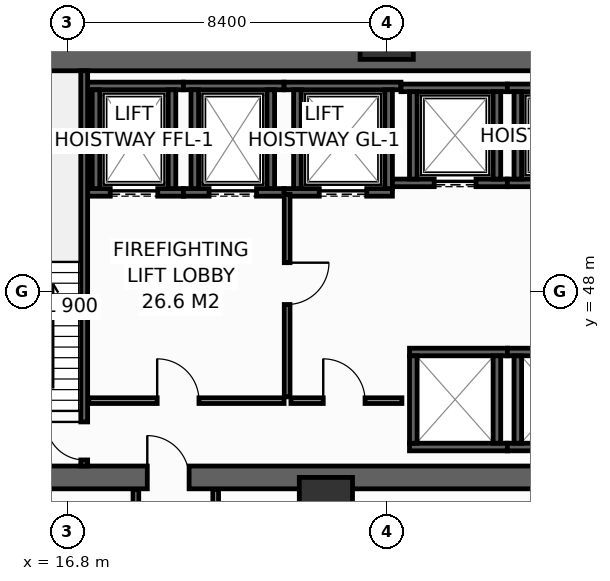
"""IFC4 building model, lengths in metres.
Left out: names, types, materials, properties, quantities, classifications, styles, units other than length and angle.
Written with IfcOpenShell. Run it as: python <this file> out.ifc"""

import sys

from ifc_helpers import new_model, si_unit, direction, frame, frame_2d, origin, origin_2d, place, context, subcontext, project, spatial, rectangle, hollow_rectangle, extrude, element, fill, save


model = new_model("IFC4")
c1 = context("Model", 3, precision=1e-05, world=origin(), true_north=direction((0.0, 1.0)))
c2 = subcontext(c1, "Body", "Model", "MODEL_VIEW")
j1 = project(units=[si_unit("LENGTHUNIT", "METRE"), si_unit("PLANEANGLEUNIT", "RADIAN")], contexts=[c1])
p1 = place(None, origin())
s1 = spatial("IfcSite", under=j1, at=p1, CompositionType="ELEMENT")
p2 = place(p1, origin())
s2 = spatial("IfcBuilding", under=s1, at=p2, CompositionType="ELEMENT")
p3 = place(p2, frame((0.0, 0.0, 27.6)))
s3 = spatial("IfcBuildingStorey", under=s2, at=p3, CompositionType="ELEMENT", Elevation=27.6)
p4 = place(p3, frame((13.5, 43.1, 0.0), z_axis=(0.0, 0.0, 1.0), x_axis=(1.0, 0.0, 0.0)))
e1 = element("IfcWall", 1, at=p4, inside=s3, PredefinedType="SHEAR", context=c2, shape_type="SweptSolid", body=[
    extrude(rectangle(XDim=32.9, YDim=0.6, at=frame_2d((16.45, 0.0))), origin(), (0.0, 0.0, 1.0), 5.15),
])
p5 = place(p4, frame((5.4, 0.0, 0.0)))
e2 = element("IfcOpeningElement", 2, at=p5, cuts=e1, PredefinedType="OPENING", context=c2, shape_type="SweptSolid", body=[
    extrude(rectangle(XDim=1.1, YDim=2.15, at=frame_2d((0.55, 1.075))), frame((0.0, 0.31, 0.0), z_axis=(0.0, -1.0, 0.0), x_axis=(1.0, 0.0, 0.0)), (0.0, 0.0, 1.0), 0.62),
])
p6 = place(p4, frame((25.6, 0.0, 0.0)))
e3 = element("IfcOpeningElement", 3, at=p6, cuts=e1, PredefinedType="OPENING", context=c2, shape_type="SweptSolid", body=[
    extrude(rectangle(XDim=1.1, YDim=2.15, at=frame_2d((0.55, 1.075))), frame((0.0, 0.31, 0.0), z_axis=(0.0, -1.0, 0.0), x_axis=(1.0, 0.0, 0.0)), (0.0, 0.0, 1.0), 0.62),
])
p7 = place(p3, frame((13.5, 54.1, 0.0), z_axis=(0.0, 0.0, 1.0), x_axis=(1.0, 0.0, 0.0)))
e4 = element("IfcWall", 4, at=p7, inside=s3, PredefinedType="SHEAR", context=c2, shape_type="SweptSolid", body=[
    extrude(rectangle(XDim=32.9, YDim=0.6, at=frame_2d((16.45, 0.0))), origin(), (0.0, 0.0, 1.0), 5.15),
])
for number, where, z_axis, x_axis in (
    (5, (25.2, 54.8, 0.0), (0.0, 0.0, 1.0), (1.0, 0.0, 0.0)),
    (6, (23.6, 42.4, 0.0), (0.0, 0.0, 1.0), (1.0, 0.0, 0.0)),
):
    element("IfcColumn", number, at=place(p3, frame(where, z_axis=z_axis, x_axis=x_axis)), inside=s3, PredefinedType="COLUMN", context=c2, shape_type="SweptSolid", body=[
        extrude(hollow_rectangle(XDim=1.4, YDim=1.4, WallThickness=0.065, at=origin_2d()), origin(), (0.0, 0.0, 1.0), 5.4),
    ])
p8 = place(p3, frame((17.33, 50.6, 0.0), z_axis=(0.0, 0.0, 1.0), x_axis=(1.0, 0.0, 0.0)))
e7 = element("IfcWall", 7, at=p8, inside=s3, PredefinedType="SHEAR", context=c2, shape_type="SweptSolid", body=[
    extrude(rectangle(XDim=2.52, YDim=0.2, at=frame_2d((1.26, 0.0))), origin(), (0.0, 0.0, 1.0), 5.15),
])
p9 = place(p8, frame((0.595, 0.0, 0.0)))
e8 = element("IfcOpeningElement", 8, at=p9, cuts=e7, PredefinedType="OPENING", context=c2, shape_type="SweptSolid", body=[
    extrude(rectangle(XDim=1.25, YDim=2.3, at=frame_2d((0.625, 1.15))), frame((0.0, 0.11, 0.0), z_axis=(0.0, -1.0, 0.0), x_axis=(1.0, 0.0, 0.0)), (0.0, 0.0, 1.0), 0.22),
])
p10 = place(p3, frame((17.33, 53.4, 0.0), z_axis=(0.0, 0.0, 1.0), x_axis=(1.0, 0.0, 0.0)))
e9 = element("IfcWall", 9, at=p10, inside=s3, PredefinedType="SHEAR", context=c2, shape_type="SweptSolid", body=[
    extrude(rectangle(XDim=2.52, YDim=0.2, at=frame_2d((1.26, 0.0))), origin(), (0.0, 0.0, 1.0), 5.15),
])
for number, where, z_axis, x_axis in (
    (10, (17.55, 50.7, 0.0), (0.0, 0.0, 1.0), (0.0, 1.0, 0.0)),
    (11, (19.55, 50.7, 0.0), (0.0, 0.0, 1.0), (0.0, 1.0, 0.0)),
):
    element("IfcWall", number, at=place(p3, frame(where, z_axis=z_axis, x_axis=x_axis)), inside=s3, PredefinedType="SHEAR", context=c2, shape_type="SweptSolid", body=[
        extrude(rectangle(XDim=2.6, YDim=0.2, at=frame_2d((1.3, 0.0))), origin(), (0.0, 0.0, 1.0), 5.15),
    ])
p11 = place(p3, frame((19.85, 50.6, 0.0), z_axis=(0.0, 0.0, 1.0), x_axis=(1.0, 0.0, 0.0)))
e12 = element("IfcWall", 12, at=p11, inside=s3, PredefinedType="SHEAR", context=c2, shape_type="SweptSolid", body=[
    extrude(rectangle(XDim=2.65, YDim=0.2, at=frame_2d((1.325, 0.0))), origin(), (0.0, 0.0, 1.0), 5.15),
])
p12 = place(p11, frame((0.675, 0.0, 0.0)))
e13 = element("IfcOpeningElement", 13, at=p12, cuts=e12, PredefinedType="OPENING", context=c2, shape_type="SweptSolid", body=[
    extrude(rectangle(XDim=1.25, YDim=2.3, at=frame_2d((0.625, 1.15))), frame((0.0, 0.11, 0.0), z_axis=(0.0, -1.0, 0.0), x_axis=(1.0, 0.0, 0.0)), (0.0, 0.0, 1.0), 0.22),
])
p13 = place(p3, frame((19.85, 53.4, 0.0), z_axis=(0.0, 0.0, 1.0), x_axis=(1.0, 0.0, 0.0)))
e14 = element("IfcWall", 14, at=p13, inside=s3, PredefinedType="SHEAR", context=c2, shape_type="SweptSolid", body=[
    extrude(rectangle(XDim=2.65, YDim=0.2, at=frame_2d((1.325, 0.0))), origin(), (0.0, 0.0, 1.0), 5.15),
])
for number, where, z_axis, x_axis in (
    (15, (20.15, 50.7, 0.0), (0.0, 0.0, 1.0), (0.0, 1.0, 0.0)),
    (16, (22.15, 50.7, 0.0), (0.0, 0.0, 1.0), (0.0, 1.0, 0.0)),
):
    element("IfcWall", number, at=place(p3, frame(where, z_axis=z_axis, x_axis=x_axis)), inside=s3, PredefinedType="SHEAR", context=c2, shape_type="SweptSolid", body=[
        extrude(rectangle(XDim=2.6, YDim=0.2, at=frame_2d((1.3, 0.0))), origin(), (0.0, 0.0, 1.0), 5.15),
    ])
p14 = place(p3, frame((22.5, 50.6, 0.0), z_axis=(0.0, 0.0, 1.0), x_axis=(1.0, 0.0, 0.0)))
e17 = element("IfcWall", 17, at=p14, inside=s3, PredefinedType="SHEAR", context=c2, shape_type="SweptSolid", body=[
    extrude(rectangle(XDim=2.85, YDim=0.2, at=frame_2d((1.425, 0.0))), origin(), (0.0, 0.0, 1.0), 5.15),
])
p15 = place(p14, frame((0.925, 0.0, 0.0)))
e18 = element("IfcOpeningElement", 18, at=p15, cuts=e17, PredefinedType="OPENING", context=c2, shape_type="SweptSolid", body=[
    extrude(rectangle(XDim=1.25, YDim=2.3, at=frame_2d((0.625, 1.15))), frame((0.0, 0.11, 0.0), z_axis=(0.0, -1.0, 0.0), x_axis=(1.0, 0.0, 0.0)), (0.0, 0.0, 1.0), 0.22),
])
p16 = place(p3, frame((22.5, 53.4, 0.0), z_axis=(0.0, 0.0, 1.0), x_axis=(1.0, 0.0, 0.0)))
e19 = element("IfcWall", 19, at=p16, inside=s3, PredefinedType="SHEAR", context=c2, shape_type="SweptSolid", body=[
    extrude(rectangle(XDim=3.075, YDim=0.2, at=frame_2d((1.538, 0.0))), origin(), (0.0, 0.0, 1.0), 5.15),
])
for number, where, z_axis, x_axis in (
    (20, (22.85, 50.7, 0.0), (0.0, 0.0, 1.0), (0.0, 1.0, 0.0)),
    (21, (25.25, 50.7, 0.0), (0.0, 0.0, 1.0), (0.0, 1.0, 0.0)),
):
    element("IfcWall", number, at=place(p3, frame(where, z_axis=z_axis, x_axis=x_axis)), inside=s3, PredefinedType="SHEAR", context=c2, shape_type="SweptSolid", body=[
        extrude(rectangle(XDim=2.6, YDim=0.2, at=frame_2d((1.3, 0.0))), origin(), (0.0, 0.0, 1.0), 5.15),
    ])
p17 = place(p3, frame((25.35, 50.85, 0.0), z_axis=(0.0, 0.0, 1.0), x_axis=(1.0, 0.0, 0.0)))
e22 = element("IfcWall", 22, at=p17, inside=s3, PredefinedType="SHEAR", context=c2, shape_type="SweptSolid", body=[
    extrude(rectangle(XDim=3.025, YDim=0.2, at=frame_2d((1.512, 0.0))), origin(), (0.0, 0.0, 1.0), 5.15),
])
p18 = place(p17, frame((1.1, 0.0, 0.0)))
e23 = element("IfcOpeningElement", 23, at=p18, cuts=e22, PredefinedType="OPENING", context=c2, shape_type="SweptSolid", body=[
    extrude(rectangle(XDim=1.1, YDim=2.2, at=frame_2d((0.55, 1.1))), frame((0.0, 0.11, 0.0), z_axis=(0.0, -1.0, 0.0), x_axis=(1.0, 0.0, 0.0)), (0.0, 0.0, 1.0), 0.22),
])
p19 = place(p3, frame((25.575, 53.35, 0.0), z_axis=(0.0, 0.0, 1.0), x_axis=(1.0, 0.0, 0.0)))
e24 = element("IfcWall", 24, at=p19, inside=s3, PredefinedType="SHEAR", context=c2, shape_type="SweptSolid", body=[
    extrude(rectangle(XDim=2.8, YDim=0.2, at=frame_2d((1.4, 0.0))), origin(), (0.0, 0.0, 1.0), 5.15),
])
for number, where, z_axis, x_axis in (
    (25, (25.9, 50.95, 0.0), (0.0, 0.0, 1.0), (0.0, 1.0, 0.0)),
    (26, (28.1, 50.95, 0.0), (0.0, 0.0, 1.0), (0.0, 1.0, 0.0)),
):
    element("IfcWall", number, at=place(p3, frame(where, z_axis=z_axis, x_axis=x_axis)), inside=s3, PredefinedType="SHEAR", context=c2, shape_type="SweptSolid", body=[
        extrude(rectangle(XDim=2.3, YDim=0.2, at=frame_2d((1.15, 0.0))), origin(), (0.0, 0.0, 1.0), 5.15),
    ])
p20 = place(p3, frame((28.375, 50.85, 0.0), z_axis=(0.0, 0.0, 1.0), x_axis=(1.0, 0.0, 0.0)))
e27 = element("IfcWall", 27, at=p20, inside=s3, PredefinedType="SHEAR", context=c2, shape_type="SweptSolid", body=[
    extrude(rectangle(XDim=2.75, YDim=0.2, at=frame_2d((1.375, 0.0))), origin(), (0.0, 0.0, 1.0), 5.15),
])
p21 = place(p20, frame((0.825, 0.0, 0.0)))
e28 = element("IfcOpeningElement", 28, at=p21, cuts=e27, PredefinedType="OPENING", context=c2, shape_type="SweptSolid", body=[
    extrude(rectangle(XDim=1.1, YDim=2.2, at=frame_2d((0.55, 1.1))), frame((0.0, 0.11, 0.0), z_axis=(0.0, -1.0, 0.0), x_axis=(1.0, 0.0, 0.0)), (0.0, 0.0, 1.0), 0.22),
])
p22 = place(p3, frame((28.375, 53.35, 0.0), z_axis=(0.0, 0.0, 1.0), x_axis=(1.0, 0.0, 0.0)))
e29 = element("IfcWall", 29, at=p22, inside=s3, PredefinedType="SHEAR", context=c2, shape_type="SweptSolid", body=[
    extrude(rectangle(XDim=2.75, YDim=0.2, at=frame_2d((1.375, 0.0))), origin(), (0.0, 0.0, 1.0), 5.15),
])
p23 = place(p3, frame((28.65, 50.95, 0.0), z_axis=(0.0, 0.0, 1.0), x_axis=(0.0, 1.0, 0.0)))
e30 = element("IfcWall", 30, at=p23, inside=s3, PredefinedType="SHEAR", context=c2, shape_type="SweptSolid", body=[
    extrude(rectangle(XDim=2.3, YDim=0.2, at=frame_2d((1.15, 0.0))), origin(), (0.0, 0.0, 1.0), 5.15),
])
for number, where, z_axis, x_axis in (
    (31, (25.8, 43.9, 0.0), (0.0, 0.0, 1.0), (1.0, 0.0, 0.0)),
    (32, (25.8, 46.4, 0.0), (0.0, 0.0, 1.0), (1.0, 0.0, 0.0)),
):
    element("IfcWall", number, at=place(p3, frame(where, z_axis=z_axis, x_axis=x_axis)), inside=s3, PredefinedType="SHEAR", context=c2, shape_type="SweptSolid", body=[
        extrude(rectangle(XDim=2.575, YDim=0.2, at=frame_2d((1.288, 0.0))), origin(), (0.0, 0.0, 1.0), 5.15),
    ])
for number, where, z_axis, x_axis in (
    (33, (25.9, 44.0, 0.0), (0.0, 0.0, 1.0), (0.0, 1.0, 0.0)),
    (34, (28.1, 44.0, 0.0), (0.0, 0.0, 1.0), (0.0, 1.0, 0.0)),
):
    element("IfcWall", number, at=place(p3, frame(where, z_axis=z_axis, x_axis=x_axis)), inside=s3, PredefinedType="SHEAR", context=c2, shape_type="SweptSolid", body=[
        extrude(rectangle(XDim=2.3, YDim=0.2, at=frame_2d((1.15, 0.0))), origin(), (0.0, 0.0, 1.0), 5.15),
    ])
for number, where, z_axis, x_axis in (
    (35, (28.375, 43.9, 0.0), (0.0, 0.0, 1.0), (1.0, 0.0, 0.0)),
    (36, (28.375, 46.4, 0.0), (0.0, 0.0, 1.0), (1.0, 0.0, 0.0)),
):
    element("IfcWall", number, at=place(p3, frame(where, z_axis=z_axis, x_axis=x_axis)), inside=s3, PredefinedType="SHEAR", context=c2, shape_type="SweptSolid", body=[
        extrude(rectangle(XDim=2.75, YDim=0.2, at=frame_2d((1.375, 0.0))), origin(), (0.0, 0.0, 1.0), 5.15),
    ])
p24 = place(p3, frame((28.65, 44.0, 0.0), z_axis=(0.0, 0.0, 1.0), x_axis=(0.0, 1.0, 0.0)))
e37 = element("IfcWall", 37, at=p24, inside=s3, PredefinedType="SHEAR", context=c2, shape_type="SweptSolid", body=[
    extrude(rectangle(XDim=2.3, YDim=0.2, at=frame_2d((1.15, 0.0))), origin(), (0.0, 0.0, 1.0), 5.15),
])
p25 = place(p3, frame((17.24, 43.4, 0.0), z_axis=(0.0, 0.0, 1.0), x_axis=(0.0, 1.0, 0.0)))
e38 = element("IfcWall", 38, at=p25, inside=s3, PredefinedType="SHEAR", context=c2, shape_type="SweptSolid", body=[
    extrude(rectangle(XDim=10.4, YDim=0.18, at=frame_2d((5.2, 0.0))), origin(), (0.0, 0.0, 1.0), 5.15),
])
p26 = place(p25, frame((0.16, 0.0, 0.0)))
e39 = element("IfcOpeningElement", 39, at=p26, cuts=e38, PredefinedType="OPENING", context=c2, shape_type="SweptSolid", body=[
    extrude(rectangle(XDim=1.0, YDim=2.15, at=frame_2d((0.5, 1.075))), frame((0.0, 0.1, 0.0), z_axis=(0.0, -1.0, 0.0), x_axis=(1.0, 0.0, 0.0)), (0.0, 0.0, 1.0), 0.2),
])
p27 = place(p3, frame((17.36, 45.12, 0.0), z_axis=(0.0, 0.0, 1.0), x_axis=(1.0, 0.0, 0.0)))
e40 = element("IfcWall", 40, at=p27, inside=s3, PredefinedType="PARTITIONING", context=c2, shape_type="SweptSolid", body=[
    extrude(rectangle(XDim=5.14, YDim=0.15, at=frame_2d((2.57, 0.0))), origin(), (0.0, 0.0, 1.0), 5.15),
])
p28 = place(p27, frame((1.8, 0.0, 0.0)))
e41 = element("IfcOpeningElement", 41, at=p28, cuts=e40, PredefinedType="OPENING", context=c2, shape_type="SweptSolid", body=[
    extrude(rectangle(XDim=1.1, YDim=2.15, at=frame_2d((0.55, 1.075))), frame((0.0, 0.085, 0.0), z_axis=(0.0, -1.0, 0.0), x_axis=(1.0, 0.0, 0.0)), (0.0, 0.0, 1.0), 0.17),
])
p29 = place(p3, frame((22.58, 50.55, 0.0), z_axis=(0.0, 0.0, 1.0), x_axis=(0.0, -1.0, 0.0)))
e42 = element("IfcWall", 42, at=p29, inside=s3, PredefinedType="PARTITIONING", context=c2, shape_type="SweptSolid", body=[
    extrude(rectangle(XDim=5.33, YDim=0.15, at=frame_2d((2.665, 0.0))), origin(), (0.0, 0.0, 1.0), 5.15),
])
p30 = place(p29, frame((1.8, 0.0, 0.0)))
e43 = element("IfcOpeningElement", 43, at=p30, cuts=e42, PredefinedType="OPENING", context=c2, shape_type="SweptSolid", body=[
    extrude(rectangle(XDim=1.1, YDim=2.15, at=frame_2d((0.55, 1.075))), frame((0.0, 0.085, 0.0), z_axis=(0.0, -1.0, 0.0), x_axis=(1.0, 0.0, 0.0)), (0.0, 0.0, 1.0), 0.17),
])
p31 = place(p3, frame((22.68, 45.12, 0.0), z_axis=(0.0, 0.0, 1.0), x_axis=(1.0, 0.0, 0.0)))
e44 = element("IfcWall", 44, at=p31, inside=s3, PredefinedType="PARTITIONING", context=c2, shape_type="SweptSolid", body=[
    extrude(rectangle(XDim=2.92, YDim=0.15, at=frame_2d((1.46, 0.0))), origin(), (0.0, 0.0, 1.0), 5.15),
])
p32 = place(p31, frame((0.85, 0.0, 0.0)))
e45 = element("IfcOpeningElement", 45, at=p32, cuts=e44, PredefinedType="OPENING", context=c2, shape_type="SweptSolid", body=[
    extrude(rectangle(XDim=1.1, YDim=2.15, at=frame_2d((0.55, 1.075))), frame((0.0, 0.085, 0.0), z_axis=(0.0, -1.0, 0.0), x_axis=(1.0, 0.0, 0.0)), (0.0, 0.0, 1.0), 0.17),
])
for number, where, z_axis, x_axis in (
    (46, (18.6, 40.75, 0.0), (0.0, 0.0, 1.0), (0.0, 1.0, 0.0)),
    (47, (20.7, 40.75, 0.0), (0.0, 0.0, 1.0), (0.0, 1.0, 0.0)),
):
    element("IfcWall", number, at=place(p3, frame(where, z_axis=z_axis, x_axis=x_axis)), inside=s3, PredefinedType="PARTITIONING", context=c2, shape_type="SweptSolid", body=[
        extrude(rectangle(XDim=2.03, YDim=0.15, at=frame_2d((1.015, 0.0))), origin(), (0.0, 0.0, 1.0), 5.15),
    ])
p33 = place(p9, origin())
e48 = element("IfcDoor", 48, at=p33, inside=s3, OperationType="SLIDING_TO_LEFT", PredefinedType="DOOR", context=c2, shape_type="SweptSolid", body=[
    extrude(rectangle(XDim=1.25, YDim=2.3, at=frame_2d((0.625, 1.15))), frame((0.0, 0.025, 0.0), z_axis=(0.0, -1.0, 0.0), x_axis=(1.0, 0.0, 0.0)), (0.0, 0.0, 1.0), 0.05),
])
fill(e8, e48)
p34 = place(p12, origin())
e49 = element("IfcDoor", 49, at=p34, inside=s3, OperationType="SLIDING_TO_LEFT", PredefinedType="DOOR", context=c2, shape_type="SweptSolid", body=[
    extrude(rectangle(XDim=1.25, YDim=2.3, at=frame_2d((0.625, 1.15))), frame((0.0, 0.025, 0.0), z_axis=(0.0, -1.0, 0.0), x_axis=(1.0, 0.0, 0.0)), (0.0, 0.0, 1.0), 0.05),
])
fill(e13, e49)
p35 = place(p15, origin())
e50 = element("IfcDoor", 50, at=p35, inside=s3, OperationType="SLIDING_TO_LEFT", PredefinedType="DOOR", context=c2, shape_type="SweptSolid", body=[
    extrude(rectangle(XDim=1.25, YDim=2.3, at=frame_2d((0.625, 1.15))), frame((0.0, 0.025, 0.0), z_axis=(0.0, -1.0, 0.0), x_axis=(1.0, 0.0, 0.0)), (0.0, 0.0, 1.0), 0.05),
])
fill(e18, e50)
p36 = place(p18, origin())
e51 = element("IfcDoor", 51, at=p36, inside=s3, OperationType="SLIDING_TO_LEFT", PredefinedType="DOOR", context=c2, shape_type="SweptSolid", body=[
    extrude(rectangle(XDim=1.1, YDim=2.2, at=frame_2d((0.55, 1.1))), frame((0.0, 0.025, 0.0), z_axis=(0.0, -1.0, 0.0), x_axis=(1.0, 0.0, 0.0)), (0.0, 0.0, 1.0), 0.05),
])
fill(e23, e51)
p37 = place(p26, origin())
e52 = element("IfcDoor", 52, at=p37, inside=s3, OperationType="SINGLE_SWING_RIGHT", PredefinedType="DOOR", context=c2, shape_type="SweptSolid", body=[
    extrude(rectangle(XDim=1.0, YDim=2.15, at=frame_2d((0.5, 1.075))), frame((0.0, 0.025, 0.0), z_axis=(0.0, -1.0, 0.0), x_axis=(1.0, 0.0, 0.0)), (0.0, 0.0, 1.0), 0.05),
])
fill(e39, e52)
p38 = place(p28, origin())
e53 = element("IfcDoor", 53, at=p38, inside=s3, OperationType="SINGLE_SWING_LEFT", PredefinedType="DOOR", context=c2, shape_type="SweptSolid", body=[
    extrude(rectangle(XDim=1.1, YDim=2.15, at=frame_2d((0.55, 1.075))), frame((0.0, 0.025, 0.0), z_axis=(0.0, -1.0, 0.0), x_axis=(1.0, 0.0, 0.0)), (0.0, 0.0, 1.0), 0.05),
])
fill(e41, e53)
p39 = place(p30, origin())
e54 = element("IfcDoor", 54, at=p39, inside=s3, OperationType="SINGLE_SWING_LEFT", PredefinedType="DOOR", context=c2, shape_type="SweptSolid", body=[
    extrude(rectangle(XDim=1.1, YDim=2.15, at=frame_2d((0.55, 1.075))), frame((0.0, 0.025, 0.0), z_axis=(0.0, -1.0, 0.0), x_axis=(1.0, 0.0, 0.0)), (0.0, 0.0, 1.0), 0.05),
])
fill(e43, e54)
p40 = place(p32, origin())
e55 = element("IfcDoor", 55, at=p40, inside=s3, OperationType="SINGLE_SWING_LEFT", PredefinedType="DOOR", context=c2, shape_type="SweptSolid", body=[
    extrude(rectangle(XDim=1.1, YDim=2.15, at=frame_2d((0.55, 1.075))), frame((0.0, 0.025, 0.0), z_axis=(0.0, -1.0, 0.0), x_axis=(1.0, 0.0, 0.0)), (0.0, 0.0, 1.0), 0.05),
])
fill(e45, e55)
p41 = place(p5, origin())
e56 = element("IfcDoor", 56, at=p41, inside=s3, OperationType="SINGLE_SWING_LEFT", PredefinedType="DOOR", context=c2, shape_type="SweptSolid", body=[
    extrude(rectangle(XDim=1.1, YDim=2.15, at=frame_2d((0.55, 1.075))), frame((0.0, 0.025, 0.0), z_axis=(0.0, -1.0, 0.0), x_axis=(1.0, 0.0, 0.0)), (0.0, 0.0, 1.0), 0.05),
])
fill(e2, e56)
save(model, sys.argv[1])
